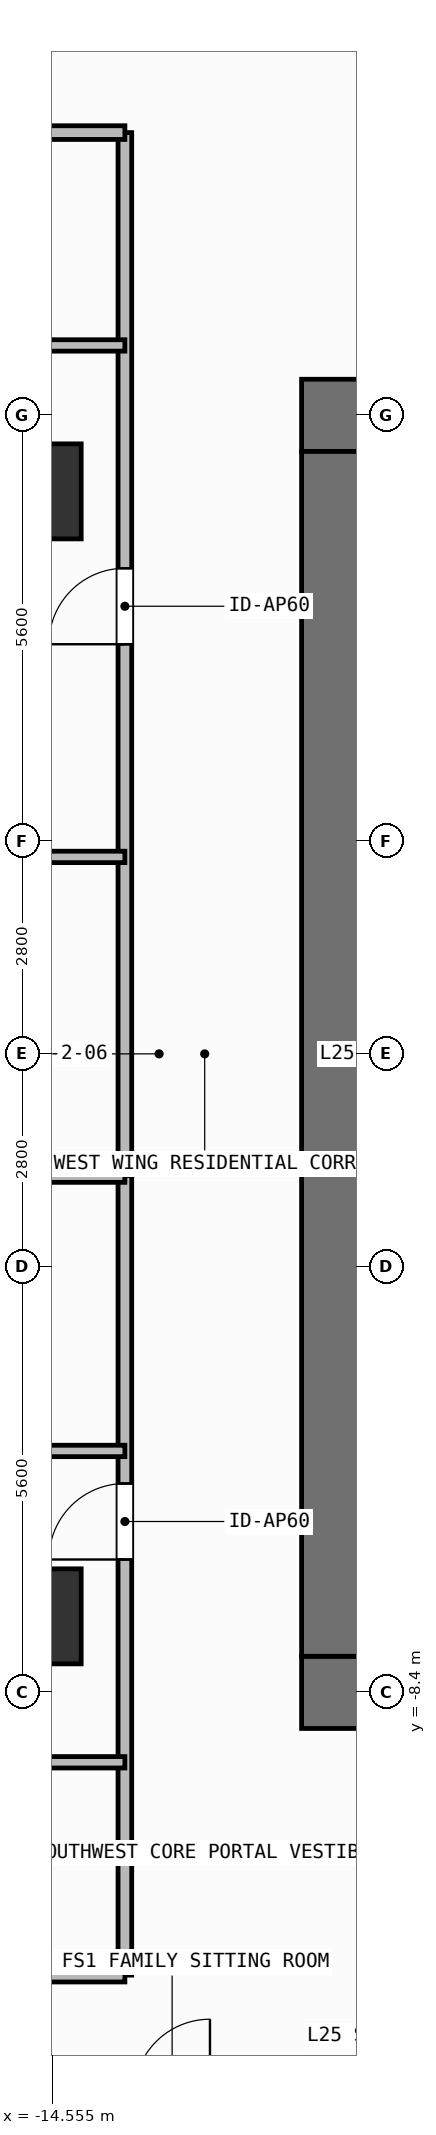
"""IFC4 building model, lengths in metres.
Left out: names, types, materials, properties, quantities, classifications, styles, units other than length and angle.
Written with IfcOpenShell. Run it as: python <this file> out.ifc"""

import sys

from ifc_helpers import new_model, si_unit, direction, frame, frame_2d, origin, origin_2d, place, context, subcontext, project, spatial, rectangle, extrude, element, fill, save


model = new_model("IFC4")
c1 = context("Model", 3, precision=1e-05, world=origin(), true_north=direction((0.0, 1.0)))
c2 = subcontext(c1, "Body", "Model", "MODEL_VIEW")
j1 = project(units=[si_unit("LENGTHUNIT", "METRE"), si_unit("PLANEANGLEUNIT", "RADIAN")], contexts=[c1])
p1 = place(None, origin())
s1 = spatial("IfcSite", under=j1, at=p1, CompositionType="ELEMENT")
p2 = place(p1, origin())
s2 = spatial("IfcBuilding", under=s1, at=p2, CompositionType="ELEMENT")
p3 = place(p2, frame((0.0, 0.0, 100.8)))
s3 = spatial("IfcBuildingStorey", under=s2, at=p3, CompositionType="ELEMENT", Elevation=100.8)
for number, where, z_axis, x_axis in (
    (1, (-11.275, -8.4, 0.0), (0.0, 0.0, 1.0), (1.0, 0.0, 0.0)),
    (2, (-11.275, 8.4, 0.0), (0.0, 0.0, 1.0), (1.0, 0.0, 0.0)),
):
    element("IfcWall", number, at=place(p3, frame(where, z_axis=z_axis, x_axis=x_axis)), inside=s3, PredefinedType="SHEAR", context=c2, shape_type="SweptSolid", body=[
        extrude(rectangle(XDim=1.575, YDim=0.95, at=frame_2d((0.788, 0.0))), origin(), (0.0, 0.0, 1.0), 3.9),
    ])
p4 = place(p3, frame((-10.8, -7.925, 0.0), z_axis=(0.0, 0.0, 1.0), x_axis=(0.0, 1.0, 0.0)))
e3 = element("IfcWall", 3, at=p4, inside=s3, PredefinedType="SHEAR", context=c2, shape_type="SweptSolid", body=[
    extrude(rectangle(XDim=15.85, YDim=0.95, at=frame_2d((7.925, 0.0))), origin(), (0.0, 0.0, 1.0), 3.9),
])
for number, where, z_axis, x_axis in (
    (4, (-14.8, -7.4, 0.0), (0.0, 0.0, 1.0), (1.0, 0.0, 0.0)),
    (5, (-14.8, 7.4, 0.0), (0.0, 0.0, 1.0), (1.0, 0.0, 0.0)),
):
    element("IfcColumn", number, at=place(p3, frame(where, z_axis=z_axis, x_axis=x_axis)), inside=s3, PredefinedType="COLUMN", context=c2, shape_type="SweptSolid", body=[
        extrude(rectangle(XDim=1.25, YDim=1.25, at=origin_2d()), origin(), (0.0, 0.0, 1.0), 3.9),
    ])
p5 = place(p3, frame((-13.6, -12.12, 0.0), z_axis=(0.0, 0.0, 1.0), x_axis=(0.0, 1.0, 0.0)))
e6 = element("IfcWall", 6, at=p5, inside=s3, PredefinedType="PARTITIONING", context=c2, shape_type="SweptSolid", body=[
    extrude(rectangle(XDim=10.52, YDim=0.18, at=frame_2d((5.26, 0.0))), origin(), (0.0, 0.0, 1.0), 3.68),
])
p6 = place(p5, frame((5.468, 0.0, 0.0)))
e7 = element("IfcOpeningElement", 7, at=p6, cuts=e6, PredefinedType="OPENING", context=c2, shape_type="SweptSolid", body=[
    extrude(rectangle(XDim=1.0, YDim=2.2, at=frame_2d((0.5, 1.1))), frame((0.0, 0.1, 0.0), z_axis=(0.0, -1.0, 0.0), x_axis=(1.0, 0.0, 0.0)), (0.0, 0.0, 1.0), 0.2),
])
p7 = place(p3, frame((-19.553, -5.224, 0.0), z_axis=(0.0, 0.0, 1.0), x_axis=(1.0, 0.0, 0.0)))
e8 = element("IfcWall", 8, at=p7, inside=s3, PredefinedType="PARTITIONING", context=c2, shape_type="SweptSolid", body=[
    extrude(rectangle(XDim=5.953, YDim=0.15, at=frame_2d((2.977, 0.0))), origin(), (0.0, 0.0, 1.0), 3.68),
])
p8 = place(p7, frame((2.64, 0.0, 0.0)))
e9 = element("IfcOpeningElement", 9, at=p8, cuts=e8, PredefinedType="OPENING", context=c2, shape_type="SweptSolid", body=[
    extrude(rectangle(XDim=0.85, YDim=2.1, at=frame_2d((0.425, 1.05))), frame((0.0, 0.085, 0.0), z_axis=(0.0, -1.0, 0.0), x_axis=(1.0, 0.0, 0.0)), (0.0, 0.0, 1.0), 0.17),
])
p9 = place(p3, frame((-23.69, -9.32, 0.0), z_axis=(0.0, 0.0, 1.0), x_axis=(1.0, 0.0, 0.0)))
e10 = element("IfcWall", 10, at=p9, inside=s3, PredefinedType="PARTITIONING", context=c2, shape_type="SweptSolid", body=[
    extrude(rectangle(XDim=10.09, YDim=0.15, at=frame_2d((5.045, 0.0))), origin(), (0.0, 0.0, 1.0), 3.68),
])
p10 = place(p9, frame((5.512, 0.0, 0.0)))
e11 = element("IfcOpeningElement", 11, at=p10, cuts=e10, PredefinedType="OPENING", context=c2, shape_type="SweptSolid", body=[
    extrude(rectangle(XDim=0.85, YDim=2.1, at=frame_2d((0.425, 1.05))), frame((0.0, 0.085, 0.0), z_axis=(0.0, -1.0, 0.0), x_axis=(1.0, 0.0, 0.0)), (0.0, 0.0, 1.0), 0.17),
])
p11 = place(p3, frame((-13.6, -1.6, 0.0), z_axis=(0.0, 0.0, 1.0), x_axis=(0.0, 1.0, 0.0)))
e12 = element("IfcWall", 12, at=p11, inside=s3, PredefinedType="PARTITIONING", context=c2, shape_type="SweptSolid", body=[
    extrude(rectangle(XDim=13.72, YDim=0.18, at=frame_2d((6.86, 0.0))), origin(), (0.0, 0.0, 1.0), 3.68),
])
p12 = place(p11, frame((6.989, 0.0, 0.0)))
e13 = element("IfcOpeningElement", 13, at=p12, cuts=e12, PredefinedType="OPENING", context=c2, shape_type="SweptSolid", body=[
    extrude(rectangle(XDim=1.0, YDim=2.2, at=frame_2d((0.5, 1.1))), frame((0.0, 0.1, 0.0), z_axis=(0.0, -1.0, 0.0), x_axis=(1.0, 0.0, 0.0)), (0.0, 0.0, 1.0), 0.2),
])
p13 = place(p3, frame((-19.553, 9.32, 0.0), z_axis=(0.0, 0.0, 1.0), x_axis=(1.0, 0.0, 0.0)))
e14 = element("IfcWall", 14, at=p13, inside=s3, PredefinedType="PARTITIONING", context=c2, shape_type="SweptSolid", body=[
    extrude(rectangle(XDim=5.953, YDim=0.15, at=frame_2d((2.977, 0.0))), origin(), (0.0, 0.0, 1.0), 3.68),
])
p14 = place(p13, frame((2.64, 0.0, 0.0)))
e15 = element("IfcOpeningElement", 15, at=p14, cuts=e14, PredefinedType="OPENING", context=c2, shape_type="SweptSolid", body=[
    extrude(rectangle(XDim=0.85, YDim=2.1, at=frame_2d((0.425, 1.05))), frame((0.0, 0.085, 0.0), z_axis=(0.0, -1.0, 0.0), x_axis=(1.0, 0.0, 0.0)), (0.0, 0.0, 1.0), 0.17),
])
p15 = place(p3, frame((-23.69, 2.591, 0.0), z_axis=(0.0, 0.0, 1.0), x_axis=(1.0, 0.0, 0.0)))
e16 = element("IfcWall", 16, at=p15, inside=s3, PredefinedType="PARTITIONING", context=c2, shape_type="SweptSolid", body=[
    extrude(rectangle(XDim=10.09, YDim=0.15, at=frame_2d((5.045, 0.0))), origin(), (0.0, 0.0, 1.0), 3.68),
])
p16 = place(p15, frame((4.62, 0.0, 0.0)))
e17 = element("IfcOpeningElement", 17, at=p16, cuts=e16, PredefinedType="OPENING", context=c2, shape_type="SweptSolid", body=[
    extrude(rectangle(XDim=0.85, YDim=2.1, at=frame_2d((0.425, 1.05))), frame((0.0, 0.085, 0.0), z_axis=(0.0, -1.0, 0.0), x_axis=(1.0, 0.0, 0.0)), (0.0, 0.0, 1.0), 0.17),
])
for number, where, z_axis, x_axis in (
    (18, (-27.93, -1.6, 0.0), (0.0, 0.0, 1.0), (1.0, 0.0, 0.0)),
    (19, (-27.93, -12.12, 0.0), (0.0, 0.0, 1.0), (1.0, 0.0, 0.0)),
    (20, (-27.93, 12.12, 0.0), (0.0, 0.0, 1.0), (1.0, 0.0, 0.0)),
):
    element("IfcWall", number, at=place(p3, frame(where, z_axis=z_axis, x_axis=x_axis)), inside=s3, PredefinedType="PARTITIONING", context=c2, shape_type="SweptSolid", body=[
        extrude(rectangle(XDim=14.33, YDim=0.18, at=frame_2d((7.165, 0.0))), origin(), (0.0, 0.0, 1.0), 3.68),
    ])
p17 = place(p6, origin())
e21 = element("IfcDoor", 21, at=p17, inside=s3, OperationType="SINGLE_SWING_LEFT", PredefinedType="DOOR", context=c2, shape_type="SweptSolid", body=[
    extrude(rectangle(XDim=1.0, YDim=2.2, at=frame_2d((0.5, 1.1))), frame((0.0, 0.025, 0.0), z_axis=(0.0, -1.0, 0.0), x_axis=(1.0, 0.0, 0.0)), (0.0, 0.0, 1.0), 0.05),
])
fill(e7, e21)
p18 = place(p12, origin())
e22 = element("IfcDoor", 22, at=p18, inside=s3, OperationType="SINGLE_SWING_LEFT", PredefinedType="DOOR", context=c2, shape_type="SweptSolid", body=[
    extrude(rectangle(XDim=1.0, YDim=2.2, at=frame_2d((0.5, 1.1))), frame((0.0, 0.025, 0.0), z_axis=(0.0, -1.0, 0.0), x_axis=(1.0, 0.0, 0.0)), (0.0, 0.0, 1.0), 0.05),
])
fill(e13, e22)
save(model, sys.argv[1])
